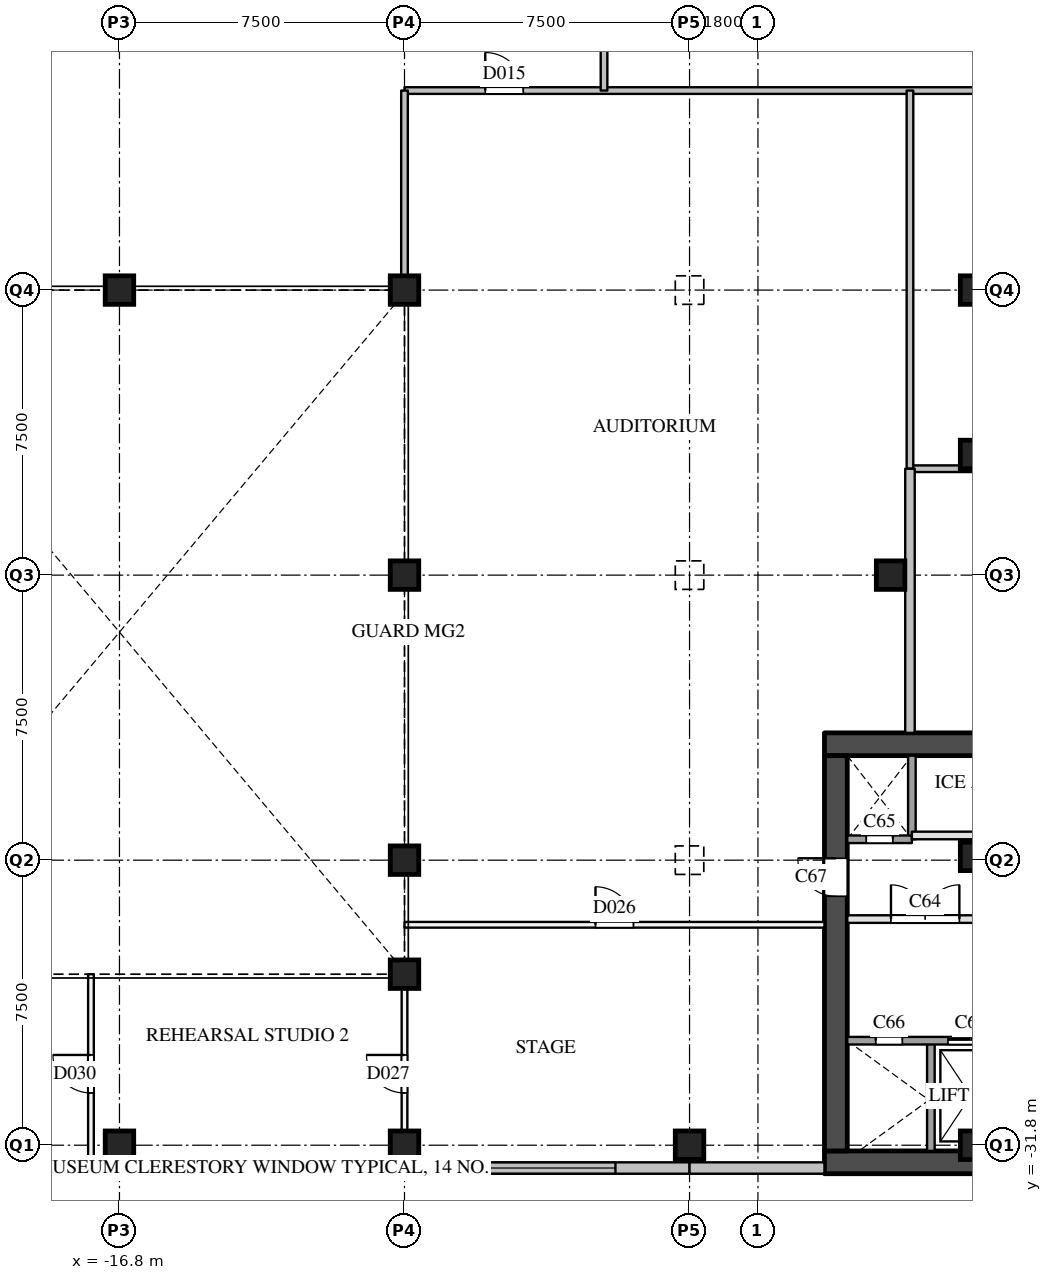
"""IFC4 building model, lengths in metres.
Left out: names, types, materials, properties, quantities, classifications, styles, units other than length and angle.
Written with IfcOpenShell. Run it as: python <this file> out.ifc"""

import sys

from ifc_helpers import new_model, si_unit, direction, frame, frame_2d, origin, origin_2d, place, context, subcontext, project, spatial, rectangle, extrude, element, fill, save


model = new_model("IFC4")
c1 = context("Model", 3, precision=1e-05, world=origin(), true_north=direction((0.0, 1.0)))
c2 = subcontext(c1, "Body", "Model", "MODEL_VIEW")
j1 = project(units=[si_unit("LENGTHUNIT", "METRE"), si_unit("PLANEANGLEUNIT", "RADIAN")], contexts=[c1])
p1 = place(None, origin())
s1 = spatial("IfcSite", under=j1, at=p1, CompositionType="ELEMENT")
p2 = place(p1, origin())
s2 = spatial("IfcBuilding", under=s1, at=p2, CompositionType="ELEMENT")
p3 = place(p2, frame((0.0, 0.0, 8.0)))
s3 = spatial("IfcBuildingStorey", under=s2, at=p3, CompositionType="ELEMENT", Elevation=8.0)
for number, where, z_axis, x_axis in (
    (1, (-16.8, -31.8, 0.0), (0.0, 0.0, 1.0), (1.0, 0.0, 0.0)),
    (2, (-16.8, -9.3, 0.0), (0.0, 0.0, 1.0), (1.0, 0.0, 0.0)),
    (3, (-9.3, -31.8, 0.0), (0.0, 0.0, 1.0), (1.0, 0.0, 0.0)),
    (4, (-9.3, -24.3, 0.0), (0.0, 0.0, 1.0), (1.0, 0.0, 0.0)),
    (5, (-9.3, -16.8, 0.0), (0.0, 0.0, 1.0), (1.0, 0.0, 0.0)),
    (6, (-9.3, -9.3, 0.0), (0.0, 0.0, 1.0), (1.0, 0.0, 0.0)),
    (7, (-1.8, -31.8, 0.0), (0.0, 0.0, 1.0), (1.0, 0.0, 0.0)),
    (8, (5.7, -31.8, 0.0), (0.0, 0.0, 1.0), (1.0, 0.0, 0.0)),
    (9, (5.7, -24.2, 0.0), (0.0, 0.0, 1.0), (1.0, 0.0, 0.0)),
    (10, (5.7, -9.3, 0.0), (0.0, 0.0, 1.0), (1.0, 0.0, 0.0)),
    (11, (-9.3, -27.3, 0.0), (0.0, 0.0, 1.0), (1.0, 0.0, 0.0)),
    (12, (5.7, -13.625, 0.0), (0.0, 0.0, 1.0), (1.0, 0.0, 0.0)),
):
    element("IfcColumn", number, at=place(p3, frame(where, z_axis=z_axis, x_axis=x_axis)), inside=s3, PredefinedType="COLUMN", context=c2, shape_type="SweptSolid", body=[
        extrude(rectangle(XDim=0.75, YDim=0.75, at=origin_2d()), origin(), (0.0, 0.0, 1.0), 6.0),
    ])
p4 = place(p3, frame((3.49, -16.8, 0.0), z_axis=(0.0, 0.0, 1.0), x_axis=(1.0, 0.0, 0.0)))
e13 = element("IfcColumn", 13, at=p4, inside=s3, PredefinedType="COLUMN", context=c2, shape_type="SweptSolid", body=[
    extrude(rectangle(XDim=0.75, YDim=0.75, at=origin_2d()), origin(), (0.0, 0.0, 1.0), 3.69),
])
p5 = place(p3, frame((-20.35, -32.4, 0.0), z_axis=(0.0, 0.0, 1.0), x_axis=(1.0, 0.0, 0.0)))
e14 = element("IfcWall", 14, at=p5, inside=s3, PredefinedType="SOLIDWALL", context=c2, shape_type="SweptSolid", body=[
    extrude(rectangle(XDim=3.55, YDim=0.3, at=frame_2d((1.775, 0.0))), origin(), (0.0, 0.0, 1.0), 5.59),
])
p6 = place(p3, frame((-16.8, -32.4, 0.0), z_axis=(0.0, 0.0, 1.0), x_axis=(1.0, 0.0, 0.0)))
e15 = element("IfcWall", 15, at=p6, inside=s3, PredefinedType="SOLIDWALL", context=c2, shape_type="SweptSolid", body=[
    extrude(rectangle(XDim=7.5, YDim=0.3, at=frame_2d((3.75, 0.0))), origin(), (0.0, 0.0, 1.0), 5.59),
])
p7 = place(p6, frame((1.95, 0.0, 2.4)))
e16 = element("IfcOpeningElement", 16, at=p7, cuts=e15, PredefinedType="OPENING", context=c2, shape_type="SweptSolid", body=[
    extrude(rectangle(XDim=3.6, YDim=1.2, at=frame_2d((1.8, 0.6))), frame((0.0, 0.16, 0.0), z_axis=(0.0, -1.0, 0.0), x_axis=(1.0, 0.0, 0.0)), (0.0, 0.0, 1.0), 0.32),
])
p8 = place(p3, frame((-9.3, -32.4, 0.0), z_axis=(0.0, 0.0, 1.0), x_axis=(1.0, 0.0, 0.0)))
e17 = element("IfcWall", 17, at=p8, inside=s3, PredefinedType="SOLIDWALL", context=c2, shape_type="SweptSolid", body=[
    extrude(rectangle(XDim=7.5, YDim=0.3, at=frame_2d((3.75, 0.0))), origin(), (0.0, 0.0, 1.0), 5.59),
])
p9 = place(p8, frame((1.95, 0.0, 2.4)))
e18 = element("IfcOpeningElement", 18, at=p9, cuts=e17, PredefinedType="OPENING", context=c2, shape_type="SweptSolid", body=[
    extrude(rectangle(XDim=3.6, YDim=1.2, at=frame_2d((1.8, 0.6))), frame((0.0, 0.16, 0.0), z_axis=(0.0, -1.0, 0.0), x_axis=(1.0, 0.0, 0.0)), (0.0, 0.0, 1.0), 0.32),
])
p10 = place(p3, frame((-1.8, -32.4, 0.0), z_axis=(0.0, 0.0, 1.0), x_axis=(1.0, 0.0, 0.0)))
e19 = element("IfcWall", 19, at=p10, inside=s3, PredefinedType="SOLIDWALL", context=c2, shape_type="SweptSolid", body=[
    extrude(rectangle(XDim=3.55, YDim=0.3, at=frame_2d((1.775, 0.0))), origin(), (0.0, 0.0, 1.0), 5.59),
])
for number, where, z_axis, x_axis in (
    (20, (1.75, -32.25, 0.0), (0.0, 0.0, 1.0), (1.0, 0.0, 0.0)),
    (21, (1.75, -21.25, 0.0), (0.0, 0.0, 1.0), (1.0, 0.0, 0.0)),
):
    element("IfcWall", number, at=place(p3, frame(where, z_axis=z_axis, x_axis=x_axis)), inside=s3, PredefinedType="SHEAR", context=c2, shape_type="SweptSolid", body=[
        extrude(rectangle(XDim=12.2, YDim=0.6, at=frame_2d((6.1, 0.0))), origin(), (0.0, 0.0, 1.0), 5.59),
    ])
p11 = place(p3, frame((2.05, -31.95, 0.0), z_axis=(0.0, 0.0, 1.0), x_axis=(0.0, 1.0, 0.0)))
e22 = element("IfcWall", 22, at=p11, inside=s3, PredefinedType="SHEAR", context=c2, shape_type="SweptSolid", body=[
    extrude(rectangle(XDim=10.4, YDim=0.6, at=frame_2d((5.2, 0.0))), origin(), (0.0, 0.0, 1.0), 5.59),
])
p12 = place(p11, frame((6.7, 0.0, 0.0)))
e23 = element("IfcOpeningElement", 23, at=p12, cuts=e22, PredefinedType="OPENING", context=c2, shape_type="SweptSolid", body=[
    extrude(rectangle(XDim=1.0, YDim=2.1, at=frame_2d((0.5, 1.05))), frame((0.0, 0.31, 0.0), z_axis=(0.0, -1.0, 0.0), x_axis=(1.0, 0.0, 0.0)), (0.0, 0.0, 1.0), 0.62),
])
p13 = place(p3, frame((4.05, -23.75, 0.0), z_axis=(0.0, 0.0, 1.0), x_axis=(0.0, 1.0, 0.0)))
e24 = element("IfcWall", 24, at=p13, inside=s3, PredefinedType="SOLIDWALL", context=c2, shape_type="SweptSolid", body=[
    extrude(rectangle(XDim=2.2, YDim=0.2, at=frame_2d((1.1, 0.0))), origin(), (0.0, 0.0, 1.0), 5.59),
])
p14 = place(p3, frame((4.55, -31.95, 0.0), z_axis=(0.0, 0.0, 1.0), x_axis=(0.0, 1.0, 0.0)))
e25 = element("IfcWall", 25, at=p14, inside=s3, PredefinedType="SOLIDWALL", context=c2, shape_type="SweptSolid", body=[
    extrude(rectangle(XDim=2.9, YDim=0.2, at=frame_2d((1.45, 0.0))), origin(), (0.0, 0.0, 1.0), 5.59),
])
p15 = place(p3, frame((2.35, -29.05, 0.0), z_axis=(0.0, 0.0, 1.0), x_axis=(1.0, 0.0, 0.0)))
e26 = element("IfcWall", 26, at=p15, inside=s3, PredefinedType="SOLIDWALL", context=c2, shape_type="SweptSolid", body=[
    extrude(rectangle(XDim=4.3, YDim=0.2, at=frame_2d((2.15, 0.0))), origin(), (0.0, 0.0, 1.0), 5.59),
])
p16 = place(p15, frame((2.65, 0.0, 0.0)))
e27 = element("IfcOpeningElement", 27, at=p16, cuts=e26, PredefinedType="OPENING", context=c2, shape_type="SweptSolid", body=[
    extrude(rectangle(XDim=1.2, YDim=2.1, at=frame_2d((0.6, 1.05))), frame((0.0, 0.11, 0.0), z_axis=(0.0, -1.0, 0.0), x_axis=(1.0, 0.0, 0.0)), (0.0, 0.0, 1.0), 0.22),
])
p17 = place(p15, frame((0.75, 0.0, 0.0)))
e28 = element("IfcOpeningElement", 28, at=p17, cuts=e26, PredefinedType="OPENING", context=c2, shape_type="SweptSolid", body=[
    extrude(rectangle(XDim=0.7, YDim=2.1, at=frame_2d((0.35, 1.05))), frame((0.0, 0.11, 0.0), z_axis=(0.0, -1.0, 0.0), x_axis=(1.0, 0.0, 0.0)), (0.0, 0.0, 1.0), 0.22),
])
p18 = place(p3, frame((2.35, -25.85, 0.0), z_axis=(0.0, 0.0, 1.0), x_axis=(1.0, 0.0, 0.0)))
e29 = element("IfcWall", 29, at=p18, inside=s3, PredefinedType="PARTITIONING", context=c2, shape_type="SweptSolid", body=[
    extrude(rectangle(XDim=4.3, YDim=0.2, at=frame_2d((2.15, 0.0))), origin(), (0.0, 0.0, 1.0), 5.59),
])
p19 = place(p18, frame((1.15, 0.0, 0.0)))
e30 = element("IfcOpeningElement", 30, at=p19, cuts=e29, PredefinedType="OPENING", context=c2, shape_type="SweptSolid", body=[
    extrude(rectangle(XDim=1.8, YDim=2.1, at=frame_2d((0.9, 1.05))), frame((0.0, 0.11, 0.0), z_axis=(0.0, -1.0, 0.0), x_axis=(1.0, 0.0, 0.0)), (0.0, 0.0, 1.0), 0.22),
])
p20 = place(p3, frame((4.05, -23.65, 0.0), z_axis=(0.0, 0.0, 1.0), x_axis=(1.0, 0.0, 0.0)))
e31 = element("IfcWall", 31, at=p20, inside=s3, PredefinedType="PARTITIONING", context=c2, shape_type="SweptSolid", body=[
    extrude(rectangle(XDim=9.3, YDim=0.2, at=frame_2d((4.65, 0.0))), origin(), (0.0, 0.0, 1.0), 5.59),
])
p21 = place(p20, frame((4.2, 0.0, 0.0)))
e32 = element("IfcOpeningElement", 32, at=p21, cuts=e31, PredefinedType="OPENING", context=c2, shape_type="SweptSolid", body=[
    extrude(rectangle(XDim=0.9, YDim=2.1, at=frame_2d((0.45, 1.05))), frame((0.0, 0.11, 0.0), z_axis=(0.0, -1.0, 0.0), x_axis=(1.0, 0.0, 0.0)), (0.0, 0.0, 1.0), 0.22),
])
p22 = place(p3, frame((2.35, -23.75, 0.0), z_axis=(0.0, 0.0, 1.0), x_axis=(1.0, 0.0, 0.0)))
e33 = element("IfcWall", 33, at=p22, inside=s3, PredefinedType="SOLIDWALL", context=c2, shape_type="SweptSolid", body=[
    extrude(rectangle(XDim=1.7, YDim=0.2, at=frame_2d((0.85, 0.0))), origin(), (0.0, 0.0, 1.0), 5.59),
])
p23 = place(p22, frame((0.5, 0.0, 0.0)))
e34 = element("IfcOpeningElement", 34, at=p23, cuts=e33, PredefinedType="OPENING", context=c2, shape_type="SweptSolid", body=[
    extrude(rectangle(XDim=0.7, YDim=2.1, at=frame_2d((0.35, 1.05))), frame((0.0, 0.11, 0.0), z_axis=(0.0, -1.0, 0.0), x_axis=(1.0, 0.0, 0.0)), (0.0, 0.0, 1.0), 0.22),
])
p24 = place(p3, frame((4.0, -14.0, 0.0), z_axis=(0.0, 0.0, 1.0), x_axis=(1.0, 0.0, 0.0)))
e35 = element("IfcWall", 35, at=p24, inside=s3, PredefinedType="PARTITIONING", context=c2, shape_type="SweptSolid", body=[
    extrude(rectangle(XDim=9.95, YDim=0.175, at=frame_2d((4.975, 0.0))), origin(), (0.0, 0.0, 1.0), 4.79),
])
p25 = place(p24, frame((4.475, 0.0, 0.0)))
e36 = element("IfcOpeningElement", 36, at=p25, cuts=e35, PredefinedType="OPENING", context=c2, shape_type="SweptSolid", body=[
    extrude(rectangle(XDim=1.0, YDim=2.1, at=frame_2d((0.5, 1.05))), frame((0.0, 0.097, 0.0), z_axis=(0.0, -1.0, 0.0), x_axis=(1.0, 0.0, 0.0)), (0.0, 0.0, 1.0), 0.195),
])
p26 = place(p3, frame((-9.3, -4.05, 0.0), z_axis=(0.0, 0.0, 1.0), x_axis=(1.0, 0.0, 0.0)))
e37 = element("IfcWall", 37, at=p26, inside=s3, PredefinedType="PARTITIONING", context=c2, shape_type="SweptSolid", body=[
    extrude(rectangle(XDim=23.25, YDim=0.175, at=frame_2d((11.625, 0.0))), origin(), (0.0, 0.0, 1.0), 4.79),
])
p27 = place(p26, frame((17.375, 0.0, 0.0)))
e38 = element("IfcOpeningElement", 38, at=p27, cuts=e37, PredefinedType="OPENING", context=c2, shape_type="SweptSolid", body=[
    extrude(rectangle(XDim=1.8, YDim=2.1, at=frame_2d((0.9, 1.05))), frame((0.0, 0.097, 0.0), z_axis=(0.0, -1.0, 0.0), x_axis=(1.0, 0.0, 0.0)), (0.0, 0.0, 1.0), 0.195),
])
p28 = place(p26, frame((2.125, 0.0, 0.0)))
e39 = element("IfcOpeningElement", 39, at=p28, cuts=e37, PredefinedType="OPENING", context=c2, shape_type="SweptSolid", body=[
    extrude(rectangle(XDim=1.0, YDim=2.1, at=frame_2d((0.5, 1.05))), frame((0.0, 0.097, 0.0), z_axis=(0.0, -1.0, 0.0), x_axis=(1.0, 0.0, 0.0)), (0.0, 0.0, 1.0), 0.195),
])
p29 = place(p3, frame((-9.3, -9.3, 0.0), z_axis=(0.0, 0.0, 1.0), x_axis=(0.0, 1.0, 0.0)))
e40 = element("IfcWall", 40, at=p29, inside=s3, PredefinedType="PARTITIONING", context=c2, shape_type="SweptSolid", body=[
    extrude(rectangle(XDim=5.25, YDim=0.175, at=frame_2d((2.625, 0.0))), origin(), (0.0, 0.0, 1.0), 4.79),
])
p30 = place(p3, frame((-4.05, -4.05, 0.0), z_axis=(0.0, 0.0, 1.0), x_axis=(0.0, 1.0, 0.0)))
e41 = element("IfcWall", 41, at=p30, inside=s3, PredefinedType="PARTITIONING", context=c2, shape_type="SweptSolid", body=[
    extrude(rectangle(XDim=63.0, YDim=0.175, at=frame_2d((31.5, 0.0))), origin(), (0.0, 0.0, 1.0), 4.79),
])
p31 = place(p30, frame((7.125, 0.0, 0.0)))
e42 = element("IfcOpeningElement", 42, at=p31, cuts=e41, PredefinedType="OPENING", context=c2, shape_type="SweptSolid", body=[
    extrude(rectangle(XDim=1.8, YDim=2.1, at=frame_2d((0.9, 1.05))), frame((0.0, 0.097, 0.0), z_axis=(0.0, -1.0, 0.0), x_axis=(1.0, 0.0, 0.0)), (0.0, 0.0, 1.0), 0.195),
])
p32 = place(p30, frame((60.775, 0.0, 0.0)))
e43 = element("IfcOpeningElement", 43, at=p32, cuts=e41, PredefinedType="OPENING", context=c2, shape_type="SweptSolid", body=[
    extrude(rectangle(XDim=1.8, YDim=2.1, at=frame_2d((0.9, 1.05))), frame((0.0, 0.097, 0.0), z_axis=(0.0, -1.0, 0.0), x_axis=(1.0, 0.0, 0.0)), (0.0, 0.0, 1.0), 0.195),
])
p33 = place(p30, frame((22.65, 0.0, 0.0)))
e44 = element("IfcOpeningElement", 44, at=p33, cuts=e41, PredefinedType="OPENING", context=c2, shape_type="SweptSolid", body=[
    extrude(rectangle(XDim=1.8, YDim=2.1, at=frame_2d((0.9, 1.05))), frame((0.0, 0.097, 0.0), z_axis=(0.0, -1.0, 0.0), x_axis=(1.0, 0.0, 0.0)), (0.0, 0.0, 1.0), 0.195),
])
p34 = place(p30, frame((37.65, 0.0, 0.0)))
e45 = element("IfcOpeningElement", 45, at=p34, cuts=e41, PredefinedType="OPENING", context=c2, shape_type="SweptSolid", body=[
    extrude(rectangle(XDim=1.8, YDim=2.1, at=frame_2d((0.9, 1.05))), frame((0.0, 0.097, 0.0), z_axis=(0.0, -1.0, 0.0), x_axis=(1.0, 0.0, 0.0)), (0.0, 0.0, 1.0), 0.195),
])
p35 = place(p30, frame((52.3, 0.0, 0.0)))
e46 = element("IfcOpeningElement", 46, at=p35, cuts=e41, PredefinedType="OPENING", context=c2, shape_type="SweptSolid", body=[
    extrude(rectangle(XDim=1.8, YDim=2.1, at=frame_2d((0.9, 1.05))), frame((0.0, 0.097, 0.0), z_axis=(0.0, -1.0, 0.0), x_axis=(1.0, 0.0, 0.0)), (0.0, 0.0, 1.0), 0.195),
])
p36 = place(p3, frame((4.0, -14.0, 0.0), z_axis=(0.0, 0.0, 1.0), x_axis=(0.0, 1.0, 0.0)))
e47 = element("IfcWall", 47, at=p36, inside=s3, PredefinedType="PARTITIONING", context=c2, shape_type="SweptSolid", body=[
    extrude(rectangle(XDim=9.95, YDim=0.175, at=frame_2d((4.975, 0.0))), origin(), (0.0, 0.0, 1.0), 3.69),
])
p37 = place(p3, frame((-9.3, -26.0, 0.0), z_axis=(0.0, 0.0, 1.0), x_axis=(1.0, 0.0, 0.0)))
e48 = element("IfcWall", 48, at=p37, inside=s3, PredefinedType="PARTITIONING", context=c2, shape_type="SweptSolid", body=[
    extrude(rectangle(XDim=11.05, YDim=0.15, at=frame_2d((5.525, 0.0))), origin(), (0.0, 0.0, 1.0), 4.79),
])
p38 = place(p37, frame((5.025, 0.0, 0.0)))
e49 = element("IfcOpeningElement", 49, at=p38, cuts=e48, PredefinedType="OPENING", context=c2, shape_type="SweptSolid", body=[
    extrude(rectangle(XDim=1.0, YDim=2.1, at=frame_2d((0.5, 1.05))), frame((0.0, 0.085, 0.0), z_axis=(0.0, -1.0, 0.0), x_axis=(1.0, 0.0, 0.0)), (0.0, 0.0, 1.0), 0.17),
])
p39 = place(p3, frame((-17.55, -32.55, 0.0), z_axis=(0.0, 0.0, 1.0), x_axis=(0.0, 1.0, 0.0)))
e50 = element("IfcWall", 50, at=p39, inside=s3, PredefinedType="PARTITIONING", context=c2, shape_type="SweptSolid", body=[
    extrude(rectangle(XDim=5.25, YDim=0.15, at=frame_2d((2.625, 0.0))), origin(), (0.0, 0.0, 1.0), 5.59),
])
p40 = place(p39, frame((2.125, 0.0, 0.0)))
e51 = element("IfcOpeningElement", 51, at=p40, cuts=e50, PredefinedType="OPENING", context=c2, shape_type="SweptSolid", body=[
    extrude(rectangle(XDim=1.0, YDim=2.1, at=frame_2d((0.5, 1.05))), frame((0.0, 0.085, 0.0), z_axis=(0.0, -1.0, 0.0), x_axis=(1.0, 0.0, 0.0)), (0.0, 0.0, 1.0), 0.17),
])
p41 = place(p3, frame((-9.3, -32.55, 0.0), z_axis=(0.0, 0.0, 1.0), x_axis=(0.0, 1.0, 0.0)))
e52 = element("IfcWall", 52, at=p41, inside=s3, PredefinedType="PARTITIONING", context=c2, shape_type="SweptSolid", body=[
    extrude(rectangle(XDim=5.25, YDim=0.15, at=frame_2d((2.625, 0.0))), origin(), (0.0, 0.0, 1.0), 4.79),
])
p42 = place(p41, frame((2.125, 0.0, 0.0)))
e53 = element("IfcOpeningElement", 53, at=p42, cuts=e52, PredefinedType="OPENING", context=c2, shape_type="SweptSolid", body=[
    extrude(rectangle(XDim=1.0, YDim=2.1, at=frame_2d((0.5, 1.05))), frame((0.0, 0.085, 0.0), z_axis=(0.0, -1.0, 0.0), x_axis=(1.0, 0.0, 0.0)), (0.0, 0.0, 1.0), 0.17),
])
p43 = place(p3, frame((4.0, -20.95, 0.0), z_axis=(0.0, 0.0, 1.0), x_axis=(0.0, 1.0, 0.0)))
e54 = element("IfcWall", 54, at=p43, inside=s3, PredefinedType="PARTITIONING", context=c2, shape_type="SweptSolid", body=[
    extrude(rectangle(XDim=6.95, YDim=0.25, at=frame_2d((3.475, 0.0))), origin(), (0.0, 0.0, 1.0), 5.59),
])
p44 = place(p7, origin())
e55 = element("IfcWindow", 55, at=p44, inside=s3, PartitioningType="SINGLE_PANEL", PredefinedType="WINDOW", context=c2, shape_type="SweptSolid", body=[
    extrude(rectangle(XDim=3.6, YDim=1.2, at=frame_2d((1.8, 0.6))), frame((0.0, 0.03, 0.0), z_axis=(0.0, -1.0, 0.0), x_axis=(1.0, 0.0, 0.0)), (0.0, 0.0, 1.0), 0.06),
])
fill(e16, e55)
p45 = place(p9, origin())
e56 = element("IfcWindow", 56, at=p45, inside=s3, PartitioningType="SINGLE_PANEL", PredefinedType="WINDOW", context=c2, shape_type="SweptSolid", body=[
    extrude(rectangle(XDim=3.6, YDim=1.2, at=frame_2d((1.8, 0.6))), frame((0.0, 0.03, 0.0), z_axis=(0.0, -1.0, 0.0), x_axis=(1.0, 0.0, 0.0)), (0.0, 0.0, 1.0), 0.06),
])
fill(e18, e56)
p46 = place(p16, origin())
e57 = element("IfcDoor", 57, at=p46, inside=s3, OperationType="SLIDING_TO_LEFT", PredefinedType="DOOR", context=c2, shape_type="SweptSolid", body=[
    extrude(rectangle(XDim=1.2, YDim=2.1, at=frame_2d((0.6, 1.05))), frame((0.0, 0.025, 0.0), z_axis=(0.0, -1.0, 0.0), x_axis=(1.0, 0.0, 0.0)), (0.0, 0.0, 1.0), 0.05),
])
fill(e27, e57)
p47 = place(p19, origin())
e58 = element("IfcDoor", 58, at=p47, inside=s3, OperationType="DOUBLE_DOOR_SINGLE_SWING", PredefinedType="DOOR", context=c2, shape_type="SweptSolid", body=[
    extrude(rectangle(XDim=1.8, YDim=2.1, at=frame_2d((0.9, 1.05))), frame((0.0, 0.025, 0.0), z_axis=(0.0, -1.0, 0.0), x_axis=(1.0, 0.0, 0.0)), (0.0, 0.0, 1.0), 0.05),
])
fill(e30, e58)
p48 = place(p23, origin())
e59 = element("IfcDoor", 59, at=p48, inside=s3, OperationType="SINGLE_SWING_RIGHT", PredefinedType="DOOR", context=c2, shape_type="SweptSolid", body=[
    extrude(rectangle(XDim=0.7, YDim=2.1, at=frame_2d((0.35, 1.05))), frame((0.0, 0.025, 0.0), z_axis=(0.0, -1.0, 0.0), x_axis=(1.0, 0.0, 0.0)), (0.0, 0.0, 1.0), 0.05),
])
fill(e34, e59)
p49 = place(p17, origin())
e60 = element("IfcDoor", 60, at=p49, inside=s3, OperationType="SINGLE_SWING_LEFT", PredefinedType="DOOR", context=c2, shape_type="SweptSolid", body=[
    extrude(rectangle(XDim=0.7, YDim=2.1, at=frame_2d((0.35, 1.05))), frame((0.0, 0.025, 0.0), z_axis=(0.0, -1.0, 0.0), x_axis=(1.0, 0.0, 0.0)), (0.0, 0.0, 1.0), 0.05),
])
fill(e28, e60)
p50 = place(p12, origin())
e61 = element("IfcDoor", 61, at=p50, inside=s3, OperationType="SINGLE_SWING_RIGHT", PredefinedType="DOOR", context=c2, shape_type="SweptSolid", body=[
    extrude(rectangle(XDim=1.0, YDim=2.1, at=frame_2d((0.5, 1.05))), frame((0.0, 0.025, 0.0), z_axis=(0.0, -1.0, 0.0), x_axis=(1.0, 0.0, 0.0)), (0.0, 0.0, 1.0), 0.05),
])
fill(e23, e61)
p51 = place(p28, origin())
e62 = element("IfcDoor", 62, at=p51, inside=s3, OperationType="SINGLE_SWING_LEFT", PredefinedType="DOOR", context=c2, shape_type="SweptSolid", body=[
    extrude(rectangle(XDim=1.0, YDim=2.1, at=frame_2d((0.5, 1.05))), frame((0.0, 0.025, 0.0), z_axis=(0.0, -1.0, 0.0), x_axis=(1.0, 0.0, 0.0)), (0.0, 0.0, 1.0), 0.05),
])
fill(e39, e62)
p52 = place(p38, origin())
e63 = element("IfcDoor", 63, at=p52, inside=s3, OperationType="SINGLE_SWING_LEFT", PredefinedType="DOOR", context=c2, shape_type="SweptSolid", body=[
    extrude(rectangle(XDim=1.0, YDim=2.1, at=frame_2d((0.5, 1.05))), frame((0.0, 0.025, 0.0), z_axis=(0.0, -1.0, 0.0), x_axis=(1.0, 0.0, 0.0)), (0.0, 0.0, 1.0), 0.05),
])
fill(e49, e63)
p53 = place(p42, origin())
e64 = element("IfcDoor", 64, at=p53, inside=s3, OperationType="SINGLE_SWING_RIGHT", PredefinedType="DOOR", context=c2, shape_type="SweptSolid", body=[
    extrude(rectangle(XDim=1.0, YDim=2.1, at=frame_2d((0.5, 1.05))), frame((0.0, 0.025, 0.0), z_axis=(0.0, -1.0, 0.0), x_axis=(1.0, 0.0, 0.0)), (0.0, 0.0, 1.0), 0.05),
])
fill(e53, e64)
p54 = place(p40, origin())
e65 = element("IfcDoor", 65, at=p54, inside=s3, OperationType="SINGLE_SWING_RIGHT", PredefinedType="DOOR", context=c2, shape_type="SweptSolid", body=[
    extrude(rectangle(XDim=1.0, YDim=2.1, at=frame_2d((0.5, 1.05))), frame((0.0, 0.025, 0.0), z_axis=(0.0, -1.0, 0.0), x_axis=(1.0, 0.0, 0.0)), (0.0, 0.0, 1.0), 0.05),
])
fill(e51, e65)
save(model, sys.argv[1])
